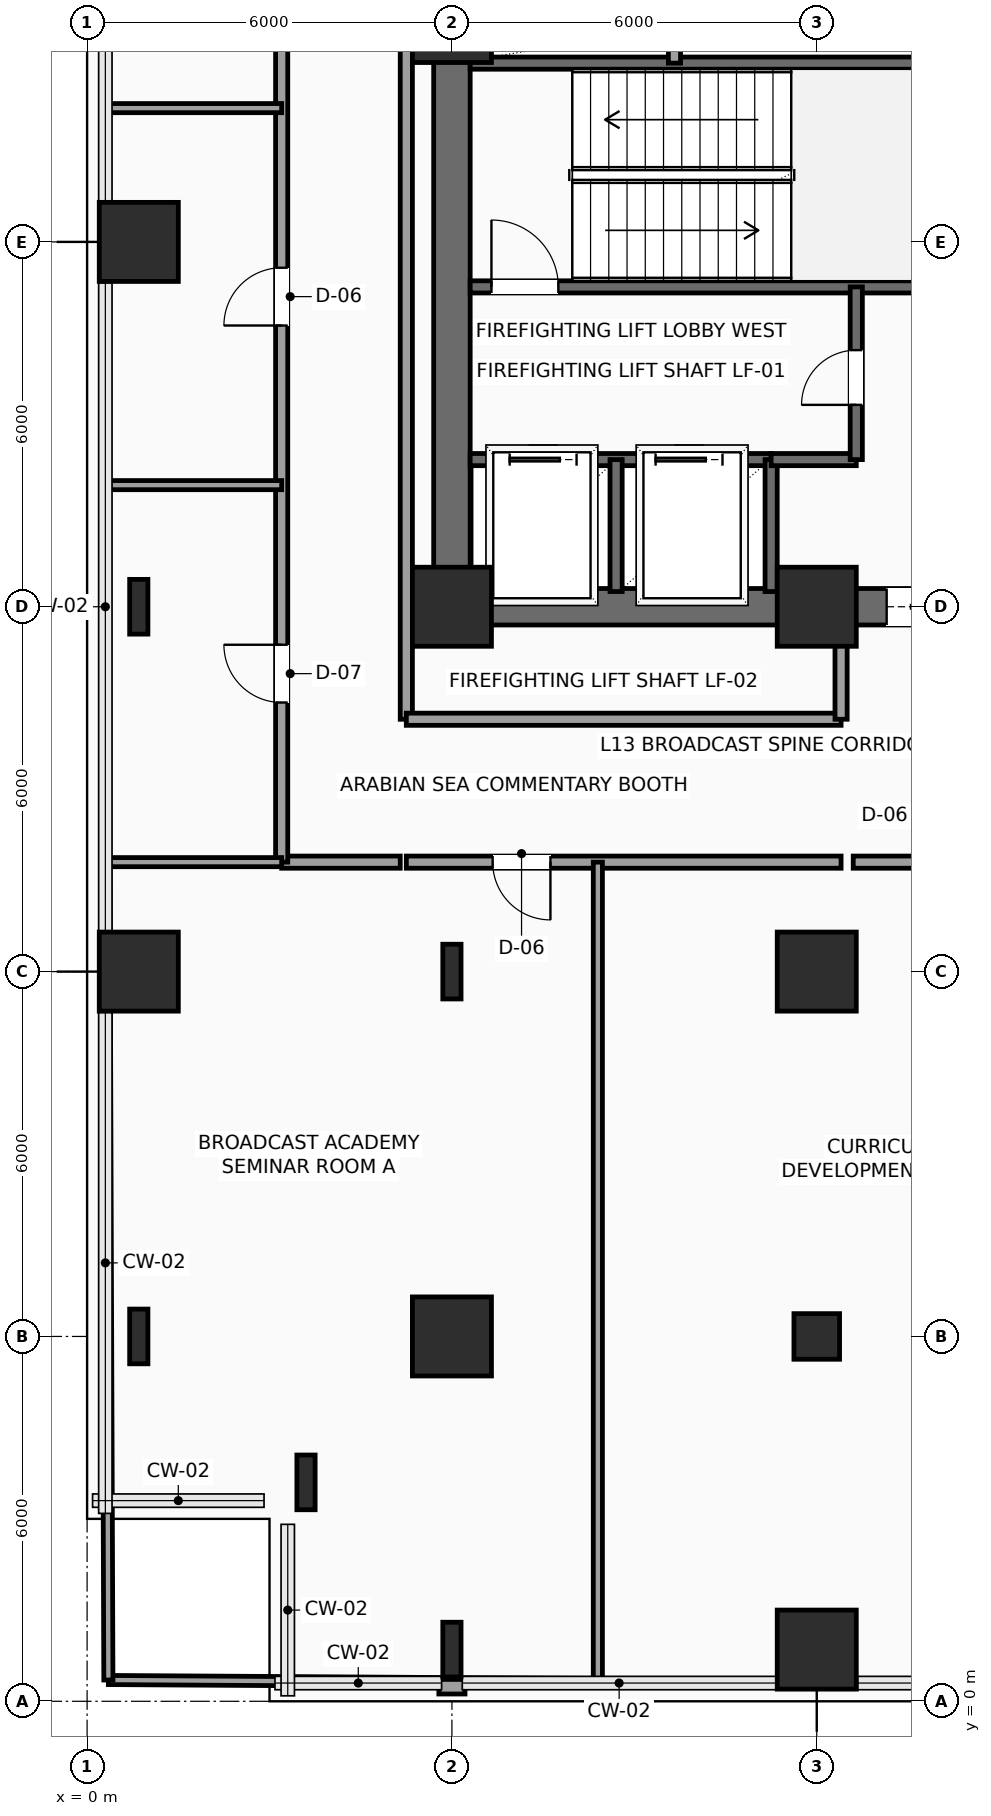
"""IFC4 building model, lengths in metres.
Left out: names, types, materials, properties, quantities, classifications, styles, units other than length and angle.
Written with IfcOpenShell. Run it as: python <this file> out.ifc"""

import sys

from ifc_helpers import new_model, si_unit, direction, frame, frame_2d, origin, origin_2d, place, context, subcontext, project, spatial, rectangle, hollow_rectangle, i_section, extrude, element, fill, save


model = new_model("IFC4")
c1 = context("Model", 3, precision=1e-05, world=origin(), true_north=direction((0.0, 1.0)))
c2 = subcontext(c1, "Body", "Model", "MODEL_VIEW")
j1 = project(units=[si_unit("LENGTHUNIT", "METRE"), si_unit("PLANEANGLEUNIT", "RADIAN")], contexts=[c1])
p1 = place(None, origin())
s1 = spatial("IfcSite", under=j1, at=p1, CompositionType="ELEMENT")
p2 = place(p1, origin())
s2 = spatial("IfcBuilding", under=s1, at=p2, CompositionType="ELEMENT")
p3 = place(p2, frame((0.0, 0.0, 59.7)))
s3 = spatial("IfcBuildingStorey", under=s2, at=p3, CompositionType="ELEMENT", Elevation=59.7)
for number, where, z_axis, x_axis in (
    (1, (6.0, 18.0, 0.0), (0.0, 0.0, 1.0), (1.0, 0.0, 0.0)),
    (2, (12.0, 18.0, 0.0), (0.0, 0.0, 1.0), (1.0, 0.0, 0.0)),
    (3, (6.0, 27.6, 0.0), (0.0, 0.0, 1.0), (1.0, 0.0, 0.0)),
):
    element("IfcColumn", number, at=place(p3, frame(where, z_axis=z_axis, x_axis=x_axis)), inside=s3, PredefinedType="COLUMN", context=c2, shape_type="SweptSolid", body=[
        extrude(rectangle(XDim=1.3, YDim=1.3, at=origin_2d()), origin(), (0.0, 0.0, 1.0), 3.9),
    ])
for number, where, z_axis, x_axis in (
    (4, (3.6, 3.6, 0.0), (0.0, 0.0, 1.0), (1.0, 0.0, 0.0)),
    (5, (0.85, 6.0, 0.0), (0.0, 0.0, 1.0), (1.0, 0.0, 0.0)),
):
    element("IfcColumn", number, at=place(p3, frame(where, z_axis=z_axis, x_axis=x_axis)), inside=s3, PredefinedType="COLUMN", context=c2, shape_type="SweptSolid", body=[
        extrude(i_section(OverallWidth=0.3, OverallDepth=0.9, WebThickness=0.019, FlangeThickness=0.035, FilletRadius=0.03, at=origin_2d()), origin(), (0.0, 0.0, 1.0), 3.9),
    ])
p4 = place(p3, frame((0.85, 12.0, 0.0), z_axis=(0.0, 0.0, 1.0), x_axis=(1.0, 0.0, 0.0)))
e6 = element("IfcColumn", 6, at=p4, inside=s3, PredefinedType="COLUMN", context=c2, shape_type="SweptSolid", body=[
    extrude(rectangle(XDim=1.3, YDim=1.3, at=origin_2d()), origin(), (0.0, 0.0, 1.0), 3.9),
])
p5 = place(p3, frame((0.85, 18.0, 0.0), z_axis=(0.0, 0.0, 1.0), x_axis=(1.0, 0.0, 0.0)))
e7 = element("IfcColumn", 7, at=p5, inside=s3, PredefinedType="COLUMN", context=c2, shape_type="SweptSolid", body=[
    extrude(i_section(OverallWidth=0.3, OverallDepth=0.9, WebThickness=0.019, FlangeThickness=0.035, FilletRadius=0.03, at=origin_2d()), origin(), (0.0, 0.0, 1.0), 3.9),
])
p6 = place(p3, frame((0.85, 24.0, 0.0), z_axis=(0.0, 0.0, 1.0), x_axis=(1.0, 0.0, 0.0)))
e8 = element("IfcColumn", 8, at=p6, inside=s3, PredefinedType="COLUMN", context=c2, shape_type="SweptSolid", body=[
    extrude(rectangle(XDim=1.3, YDim=1.3, at=origin_2d()), origin(), (0.0, 0.0, 1.0), 3.9),
])
p7 = place(p3, frame((6.0, 0.85, 0.0), z_axis=(0.0, 0.0, 1.0), x_axis=(1.0, 0.0, 0.0)))
e9 = element("IfcColumn", 9, at=p7, inside=s3, PredefinedType="COLUMN", context=c2, shape_type="SweptSolid", body=[
    extrude(i_section(OverallWidth=0.3, OverallDepth=0.9, WebThickness=0.019, FlangeThickness=0.035, FilletRadius=0.03, at=origin_2d()), origin(), (0.0, 0.0, 1.0), 3.9),
])
p8 = place(p3, frame((6.0, 6.0, 0.0), z_axis=(0.0, 0.0, 1.0), x_axis=(1.0, 0.0, 0.0)))
e10 = element("IfcColumn", 10, at=p8, inside=s3, PredefinedType="COLUMN", context=c2, shape_type="SweptSolid", body=[
    extrude(rectangle(XDim=1.3, YDim=1.3, at=origin_2d()), origin(), (0.0, 0.0, 1.0), 3.9),
])
p9 = place(p3, frame((6.0, 12.0, 0.0), z_axis=(0.0, 0.0, 1.0), x_axis=(1.0, 0.0, 0.0)))
e11 = element("IfcColumn", 11, at=p9, inside=s3, PredefinedType="COLUMN", context=c2, shape_type="SweptSolid", body=[
    extrude(i_section(OverallWidth=0.3, OverallDepth=0.9, WebThickness=0.019, FlangeThickness=0.035, FilletRadius=0.03, at=origin_2d()), origin(), (0.0, 0.0, 1.0), 3.9),
])
p10 = place(p3, frame((12.0, 0.85, 0.0), z_axis=(0.0, 0.0, 1.0), x_axis=(1.0, 0.0, 0.0)))
e12 = element("IfcColumn", 12, at=p10, inside=s3, PredefinedType="COLUMN", context=c2, shape_type="SweptSolid", body=[
    extrude(rectangle(XDim=1.3, YDim=1.3, at=origin_2d()), origin(), (0.0, 0.0, 1.0), 3.9),
])
p11 = place(p3, frame((12.0, 6.0, 0.0), z_axis=(0.0, 0.0, 1.0), x_axis=(1.0, 0.0, 0.0)))
e13 = element("IfcColumn", 13, at=p11, inside=s3, PredefinedType="COLUMN", context=c2, shape_type="SweptSolid", body=[
    extrude(hollow_rectangle(XDim=0.75, YDim=0.75, WallThickness=0.035, InnerFilletRadius=0.035, OuterFilletRadius=0.05, at=origin_2d()), origin(), (0.0, 0.0, 1.0), 3.9),
])
p12 = place(p3, frame((12.0, 12.0, 0.0), z_axis=(0.0, 0.0, 1.0), x_axis=(1.0, 0.0, 0.0)))
e14 = element("IfcColumn", 14, at=p12, inside=s3, PredefinedType="COLUMN", context=c2, shape_type="SweptSolid", body=[
    extrude(rectangle(XDim=1.3, YDim=1.3, at=origin_2d()), origin(), (0.0, 0.0, 1.0), 3.9),
])
p13 = place(p3, frame((6.215, 0.24, 0.0), z_axis=(0.0, 0.0, 1.0), x_axis=(-1.0, 0.0, 0.0)))
e15 = element("IfcWall", 15, at=p13, inside=s3, PredefinedType="SOLIDWALL", context=c2, shape_type="SweptSolid", body=[
    extrude(rectangle(XDim=0.43, YDim=0.24, at=frame_2d((0.215, 0.0))), origin(), (0.0, 0.0, 1.0), 3.65),
])
p14 = place(p3, frame((6.0, 18.0, 0.0), z_axis=(0.0, 0.0, 1.0), x_axis=(1.0, 0.0, 0.0)))
e16 = element("IfcWall", 16, at=p14, inside=s3, PredefinedType="SHEAR", context=c2, shape_type="SweptSolid", body=[
    extrude(rectangle(XDim=12.0, YDim=0.6, at=frame_2d((6.0, 0.0))), origin(), (0.0, 0.0, 1.0), 3.65),
])
p15 = place(p14, frame((7.15, 0.0, 0.0)))
e17 = element("IfcOpeningElement", 17, at=p15, cuts=e16, PredefinedType="OPENING", context=c2, shape_type="SweptSolid", body=[
    extrude(rectangle(XDim=1.6, YDim=2.3, at=frame_2d((0.8, 1.15))), frame((0.0, 0.31, 0.0), z_axis=(0.0, -1.0, 0.0), x_axis=(1.0, 0.0, 0.0)), (0.0, 0.0, 1.0), 0.62),
])
p16 = place(p3, frame((6.0, 18.0, 0.0), z_axis=(0.0, 0.0, 1.0), x_axis=(0.0, 1.0, 0.0)))
e18 = element("IfcWall", 18, at=p16, inside=s3, PredefinedType="SHEAR", context=c2, shape_type="SweptSolid", body=[
    extrude(rectangle(XDim=9.6, YDim=0.6, at=frame_2d((4.8, 0.0))), origin(), (0.0, 0.0, 1.0), 3.65),
])
p17 = place(p3, frame((6.3, 23.26, 0.0), z_axis=(0.0, 0.0, 1.0), x_axis=(1.0, 0.0, 0.0)))
e19 = element("IfcWall", 19, at=p17, inside=s3, PredefinedType="SHEAR", context=c2, shape_type="SweptSolid", body=[
    extrude(rectangle(XDim=8.88, YDim=0.2, at=frame_2d((4.44, 0.0))), origin(), (0.0, 0.0, 1.0), 3.65),
])
p18 = place(p17, frame((0.35, 0.0, 0.0)))
e20 = element("IfcOpeningElement", 20, at=p18, cuts=e19, PredefinedType="OPENING", context=c2, shape_type="SweptSolid", body=[
    extrude(rectangle(XDim=1.1, YDim=2.2, at=frame_2d((0.55, 1.1))), frame((0.0, 0.11, 0.0), z_axis=(0.0, -1.0, 0.0), x_axis=(1.0, 0.0, 0.0)), (0.0, 0.0, 1.0), 0.22),
])
p19 = place(p3, frame((6.3, 26.94, 0.0), z_axis=(0.0, 0.0, 1.0), x_axis=(1.0, 0.0, 0.0)))
e21 = element("IfcWall", 21, at=p19, inside=s3, PredefinedType="SHEAR", context=c2, shape_type="SweptSolid", body=[
    extrude(rectangle(XDim=8.88, YDim=0.2, at=frame_2d((4.44, 0.0))), origin(), (0.0, 0.0, 1.0), 3.65),
])
p20 = place(p3, frame((6.3, 20.42, 0.0), z_axis=(0.0, 0.0, 1.0), x_axis=(1.0, 0.0, 0.0)))
e22 = element("IfcWall", 22, at=p20, inside=s3, PredefinedType="SHEAR", context=c2, shape_type="SweptSolid", body=[
    extrude(rectangle(XDim=4.95, YDim=0.2, at=frame_2d((2.475, 0.0))), origin(), (0.0, 0.0, 1.0), 3.65),
])
p21 = place(p20, frame((0.65, 0.0, 0.0)))
e23 = element("IfcOpeningElement", 23, at=p21, cuts=e22, PredefinedType="OPENING", context=c2, shape_type="SweptSolid", body=[
    extrude(rectangle(XDim=1.1, YDim=2.2, at=frame_2d((0.55, 1.1))), frame((0.0, 0.11, 0.0), z_axis=(0.0, -1.0, 0.0), x_axis=(1.0, 0.0, 0.0)), (0.0, 0.0, 1.0), 0.22),
])
p22 = place(p20, frame((3.05, 0.0, 0.0)))
e24 = element("IfcOpeningElement", 24, at=p22, cuts=e22, PredefinedType="OPENING", context=c2, shape_type="SweptSolid", body=[
    extrude(rectangle(XDim=1.1, YDim=2.2, at=frame_2d((0.55, 1.1))), frame((0.0, 0.11, 0.0), z_axis=(0.0, -1.0, 0.0), x_axis=(1.0, 0.0, 0.0)), (0.0, 0.0, 1.0), 0.22),
])
for number, where, z_axis, x_axis in (
    (25, (8.7, 18.25, 0.0), (0.0, 0.0, 1.0), (0.0, 1.0, 0.0)),
    (26, (11.25, 18.25, 0.0), (0.0, 0.0, 1.0), (0.0, 1.0, 0.0)),
):
    element("IfcWall", number, at=place(p3, frame(where, z_axis=z_axis, x_axis=x_axis)), inside=s3, PredefinedType="SHEAR", context=c2, shape_type="SweptSolid", body=[
        extrude(rectangle(XDim=2.17, YDim=0.2, at=frame_2d((1.085, 0.0))), origin(), (0.0, 0.0, 1.0), 3.65),
    ])
p23 = place(p3, frame((11.25, 20.42, 0.0), z_axis=(0.0, 0.0, 1.0), x_axis=(1.0, 0.0, 0.0)))
e27 = element("IfcWall", 27, at=p23, inside=s3, PredefinedType="SHEAR", context=c2, shape_type="SweptSolid", body=[
    extrude(rectangle(XDim=1.4, YDim=0.2, at=frame_2d((0.7, 0.0))), origin(), (0.0, 0.0, 1.0), 3.65),
])
p24 = place(p3, frame((12.65, 20.42, 0.0), z_axis=(0.0, 0.0, 1.0), x_axis=(0.0, 1.0, 0.0)))
e28 = element("IfcWall", 28, at=p24, inside=s3, PredefinedType="SHEAR", context=c2, shape_type="SweptSolid", body=[
    extrude(rectangle(XDim=2.84, YDim=0.2, at=frame_2d((1.42, 0.0))), origin(), (0.0, 0.0, 1.0), 3.65),
])
p25 = place(p24, frame((0.9, 0.0, 0.0)))
e29 = element("IfcOpeningElement", 29, at=p25, cuts=e28, PredefinedType="OPENING", context=c2, shape_type="SweptSolid", body=[
    extrude(rectangle(XDim=0.9, YDim=2.15, at=frame_2d((0.45, 1.075))), frame((0.0, 0.11, 0.0), z_axis=(0.0, -1.0, 0.0), x_axis=(1.0, 0.0, 0.0)), (0.0, 0.0, 1.0), 0.22),
])
p26 = place(p3, frame((9.66, 26.94, 0.0), z_axis=(0.0, 0.0, 1.0), x_axis=(0.0, 1.0, 0.0)))
e30 = element("IfcWall", 30, at=p26, inside=s3, PredefinedType="SOLIDWALL", context=c2, shape_type="SweptSolid", body=[
    extrude(rectangle(XDim=0.64, YDim=0.2, at=frame_2d((0.32, 0.0))), origin(), (0.0, 0.0, 1.0), 3.65),
])
p27 = place(p3, frame((21.55, 13.8, 0.0), z_axis=(0.0, 0.0, 1.0), x_axis=(-1.0, 0.0, 0.0)))
e31 = element("IfcWall", 31, at=p27, inside=s3, PredefinedType="SOLIDWALL", context=c2, shape_type="SweptSolid", body=[
    extrude(rectangle(XDim=8.95, YDim=0.2, at=frame_2d((4.475, 0.0))), origin(), (0.0, 0.0, 1.0), 3.65),
])
p28 = place(p27, frame((6.875, 0.0, 0.0)))
e32 = element("IfcOpeningElement", 32, at=p28, cuts=e31, PredefinedType="OPENING", context=c2, shape_type="SweptSolid", body=[
    extrude(rectangle(XDim=0.95, YDim=2.15, at=frame_2d((0.475, 1.075))), frame((0.0, 0.11, 0.0), z_axis=(0.0, -1.0, 0.0), x_axis=(1.0, 0.0, 0.0)), (0.0, 0.0, 1.0), 0.22),
])
p29 = place(p27, frame((1.93, 0.0, 0.0)))
e33 = element("IfcOpeningElement", 33, at=p29, cuts=e31, PredefinedType="OPENING", context=c2, shape_type="SweptSolid", body=[
    extrude(rectangle(XDim=0.95, YDim=2.15, at=frame_2d((0.475, 1.075))), frame((0.0, 0.11, 0.0), z_axis=(0.0, -1.0, 0.0), x_axis=(1.0, 0.0, 0.0)), (0.0, 0.0, 1.0), 0.22),
])
p30 = place(p3, frame((12.4, 13.8, 0.0), z_axis=(0.0, 0.0, 1.0), x_axis=(-1.0, 0.0, 0.0)))
e34 = element("IfcWall", 34, at=p30, inside=s3, PredefinedType="SOLIDWALL", context=c2, shape_type="SweptSolid", body=[
    extrude(rectangle(XDim=7.15, YDim=0.2, at=frame_2d((3.575, 0.0))), origin(), (0.0, 0.0, 1.0), 3.65),
])
p31 = place(p30, frame((4.78, 0.0, 0.0)))
e35 = element("IfcOpeningElement", 35, at=p31, cuts=e34, PredefinedType="OPENING", context=c2, shape_type="SweptSolid", body=[
    extrude(rectangle(XDim=0.95, YDim=2.15, at=frame_2d((0.475, 1.075))), frame((0.0, 0.11, 0.0), z_axis=(0.0, -1.0, 0.0), x_axis=(1.0, 0.0, 0.0)), (0.0, 0.0, 1.0), 0.22),
])
p32 = place(p3, frame((5.15, 13.8, 0.0), z_axis=(0.0, 0.0, 1.0), x_axis=(-1.0, 0.0, 0.0)))
e36 = element("IfcWall", 36, at=p32, inside=s3, PredefinedType="SOLIDWALL", context=c2, shape_type="SweptSolid", body=[
    extrude(rectangle(XDim=1.95, YDim=0.2, at=frame_2d((0.975, 0.0))), origin(), (0.0, 0.0, 1.0), 3.65),
])
p33 = place(p3, frame((3.2, 13.8, 0.0), z_axis=(0.0, 0.0, 1.0), x_axis=(0.0, 1.0, 0.0)))
e37 = element("IfcWall", 37, at=p33, inside=s3, PredefinedType="SOLIDWALL", context=c2, shape_type="SweptSolid", body=[
    extrude(rectangle(XDim=16.45, YDim=0.2, at=frame_2d((8.225, 0.0))), origin(), (0.0, 0.0, 1.0), 3.65),
])
p34 = place(p33, frame((2.625, 0.0, 0.0)))
e38 = element("IfcOpeningElement", 38, at=p34, cuts=e37, PredefinedType="OPENING", context=c2, shape_type="SweptSolid", body=[
    extrude(rectangle(XDim=0.95, YDim=2.15, at=frame_2d((0.475, 1.075))), frame((0.0, 0.11, 0.0), z_axis=(0.0, -1.0, 0.0), x_axis=(1.0, 0.0, 0.0)), (0.0, 0.0, 1.0), 0.22),
])
p35 = place(p33, frame((8.825, 0.0, 0.0)))
e39 = element("IfcOpeningElement", 39, at=p35, cuts=e37, PredefinedType="OPENING", context=c2, shape_type="SweptSolid", body=[
    extrude(rectangle(XDim=0.95, YDim=2.15, at=frame_2d((0.475, 1.075))), frame((0.0, 0.11, 0.0), z_axis=(0.0, -1.0, 0.0), x_axis=(1.0, 0.0, 0.0)), (0.0, 0.0, 1.0), 0.22),
])
p36 = place(p33, frame((13.95, 0.0, 0.0)))
e40 = element("IfcOpeningElement", 40, at=p36, cuts=e37, PredefinedType="OPENING", context=c2, shape_type="SweptSolid", body=[
    extrude(rectangle(XDim=0.95, YDim=2.15, at=frame_2d((0.475, 1.075))), frame((0.0, 0.11, 0.0), z_axis=(0.0, -1.0, 0.0), x_axis=(1.0, 0.0, 0.0)), (0.0, 0.0, 1.0), 0.22),
])
p37 = place(p3, frame((5.25, 30.25, 0.0), z_axis=(0.0, 0.0, 1.0), x_axis=(0.0, -1.0, 0.0)))
e41 = element("IfcWall", 41, at=p37, inside=s3, PredefinedType="SOLIDWALL", context=c2, shape_type="SweptSolid", body=[
    extrude(rectangle(XDim=14.1, YDim=0.2, at=frame_2d((7.05, 0.0))), origin(), (0.0, 0.0, 1.0), 3.65),
])
p38 = place(p3, frame((5.25, 16.15, 0.0), z_axis=(0.0, 0.0, 1.0), x_axis=(1.0, 0.0, 0.0)))
e42 = element("IfcWall", 42, at=p38, inside=s3, PredefinedType="SOLIDWALL", context=c2, shape_type="SweptSolid", body=[
    extrude(rectangle(XDim=7.15, YDim=0.2, at=frame_2d((3.575, 0.0))), origin(), (0.0, 0.0, 1.0), 3.65),
])
p39 = place(p3, frame((12.4, 16.15, 0.0), z_axis=(0.0, 0.0, 1.0), x_axis=(0.0, 1.0, 0.0)))
e43 = element("IfcWall", 43, at=p39, inside=s3, PredefinedType="SOLIDWALL", context=c2, shape_type="SweptSolid", body=[
    extrude(rectangle(XDim=1.8, YDim=0.2, at=frame_2d((0.9, 0.0))), origin(), (0.0, 0.0, 1.0), 3.65),
])
p40 = place(p3, frame((0.35, 0.35, 0.0), z_axis=(0.0, 0.0, 1.0), x_axis=(0.999980506152, -0.006243982317, 0.0)))
e44 = element("IfcWall", 44, at=p40, inside=s3, PredefinedType="PARTITIONING", context=c2, shape_type="SweptSolid", body=[
    extrude(rectangle(XDim=5.435, YDim=0.15, at=frame_2d((2.717, 0.0))), origin(), (0.0, 0.0, 1.0), 3.65),
])
p41 = place(p3, frame((6.215, 0.314, 0.0), z_axis=(0.0, 0.0, 1.0), x_axis=(0.99998042128, -0.006257559905, 0.0)))
e45 = element("IfcWall", 45, at=p41, inside=s3, PredefinedType="PARTITIONING", context=c2, shape_type="SweptSolid", body=[
    extrude(rectangle(XDim=2.185, YDim=0.15, at=frame_2d((1.092, 0.0))), origin(), (0.0, 0.0, 1.0), 3.65),
])
p42 = place(p3, frame((0.35, 0.35, 0.0), z_axis=(0.0, 0.0, 1.0), x_axis=(-0.003721090209, 0.99999307672, 0.0)))
e46 = element("IfcWall", 46, at=p42, inside=s3, PredefinedType="PARTITIONING", context=c2, shape_type="SweptSolid", body=[
    extrude(rectangle(XDim=13.45, YDim=0.15, at=frame_2d((6.725, 0.0))), origin(), (0.0, 0.0, 1.0), 3.65),
])
p43 = place(p3, frame((8.4, 0.3, 0.0), z_axis=(0.0, 0.0, 1.0), x_axis=(0.0, 1.0, 0.0)))
e47 = element("IfcWall", 47, at=p43, inside=s3, PredefinedType="PARTITIONING", context=c2, shape_type="SweptSolid", body=[
    extrude(rectangle(XDim=13.5, YDim=0.15, at=frame_2d((6.75, 0.0))), origin(), (0.0, 0.0, 1.0), 3.65),
])
for number, where, z_axis, x_axis in (
    (48, (0.3, 13.8, 0.0), (0.0, 0.0, 1.0), (1.0, 0.0, 0.0)),
    (49, (0.3, 20.0, 0.0), (0.0, 0.0, 1.0), (1.0, 0.0, 0.0)),
    (50, (0.3, 26.2, 0.0), (0.0, 0.0, 1.0), (1.0, 0.0, 0.0)),
):
    element("IfcWall", number, at=place(p3, frame(where, z_axis=z_axis, x_axis=x_axis)), inside=s3, PredefinedType="PARTITIONING", context=c2, shape_type="SweptSolid", body=[
        extrude(rectangle(XDim=2.9, YDim=0.15, at=frame_2d((1.45, 0.0))), origin(), (0.0, 0.0, 1.0), 3.65),
    ])
p44 = place(p15, origin())
e51 = element("IfcDoor", 51, at=p44, inside=s3, OperationType="DOUBLE_DOOR_SLIDING", PredefinedType="DOOR", context=c2, shape_type="SweptSolid", body=[
    extrude(rectangle(XDim=1.6, YDim=2.3, at=frame_2d((0.8, 1.15))), frame((0.0, 0.025, 0.0), z_axis=(0.0, -1.0, 0.0), x_axis=(1.0, 0.0, 0.0)), (0.0, 0.0, 1.0), 0.05),
])
fill(e17, e51)
p45 = place(p18, origin())
e52 = element("IfcDoor", 52, at=p45, inside=s3, OperationType="SINGLE_SWING_LEFT", PredefinedType="DOOR", context=c2, shape_type="SweptSolid", body=[
    extrude(rectangle(XDim=1.1, YDim=2.2, at=frame_2d((0.55, 1.1))), frame((0.0, 0.025, 0.0), z_axis=(0.0, -1.0, 0.0), x_axis=(1.0, 0.0, 0.0)), (0.0, 0.0, 1.0), 0.05),
])
fill(e20, e52)
p46 = place(p21, origin())
e53 = element("IfcDoor", 53, at=p46, inside=s3, OperationType="SLIDING_TO_LEFT", PredefinedType="DOOR", context=c2, shape_type="SweptSolid", body=[
    extrude(rectangle(XDim=1.1, YDim=2.2, at=frame_2d((0.55, 1.1))), frame((0.0, 0.025, 0.0), z_axis=(0.0, -1.0, 0.0), x_axis=(1.0, 0.0, 0.0)), (0.0, 0.0, 1.0), 0.05),
])
fill(e23, e53)
p47 = place(p22, origin())
e54 = element("IfcDoor", 54, at=p47, inside=s3, OperationType="SLIDING_TO_LEFT", PredefinedType="DOOR", context=c2, shape_type="SweptSolid", body=[
    extrude(rectangle(XDim=1.1, YDim=2.2, at=frame_2d((0.55, 1.1))), frame((0.0, 0.025, 0.0), z_axis=(0.0, -1.0, 0.0), x_axis=(1.0, 0.0, 0.0)), (0.0, 0.0, 1.0), 0.05),
])
fill(e24, e54)
p48 = place(p25, origin())
e55 = element("IfcDoor", 55, at=p48, inside=s3, OperationType="SINGLE_SWING_LEFT", PredefinedType="DOOR", context=c2, shape_type="SweptSolid", body=[
    extrude(rectangle(XDim=0.9, YDim=2.15, at=frame_2d((0.45, 1.075))), frame((0.0, 0.025, 0.0), z_axis=(0.0, -1.0, 0.0), x_axis=(1.0, 0.0, 0.0)), (0.0, 0.0, 1.0), 0.05),
])
fill(e29, e55)
p49 = place(p31, origin())
e56 = element("IfcDoor", 56, at=p49, inside=s3, OperationType="SINGLE_SWING_LEFT", PredefinedType="DOOR", context=c2, shape_type="SweptSolid", body=[
    extrude(rectangle(XDim=0.95, YDim=2.15, at=frame_2d((0.475, 1.075))), frame((0.0, 0.025, 0.0), z_axis=(0.0, -1.0, 0.0), x_axis=(1.0, 0.0, 0.0)), (0.0, 0.0, 1.0), 0.05),
])
fill(e35, e56)
p50 = place(p34, origin())
e57 = element("IfcDoor", 57, at=p50, inside=s3, OperationType="SINGLE_SWING_RIGHT", PredefinedType="DOOR", context=c2, shape_type="SweptSolid", body=[
    extrude(rectangle(XDim=0.95, YDim=2.15, at=frame_2d((0.475, 1.075))), frame((0.0, 0.025, 0.0), z_axis=(0.0, -1.0, 0.0), x_axis=(1.0, 0.0, 0.0)), (0.0, 0.0, 1.0), 0.05),
])
fill(e38, e57)
p51 = place(p35, origin())
e58 = element("IfcDoor", 58, at=p51, inside=s3, OperationType="SINGLE_SWING_LEFT", PredefinedType="DOOR", context=c2, shape_type="SweptSolid", body=[
    extrude(rectangle(XDim=0.95, YDim=2.15, at=frame_2d((0.475, 1.075))), frame((0.0, 0.025, 0.0), z_axis=(0.0, -1.0, 0.0), x_axis=(1.0, 0.0, 0.0)), (0.0, 0.0, 1.0), 0.05),
])
fill(e39, e58)
save(model, sys.argv[1])
